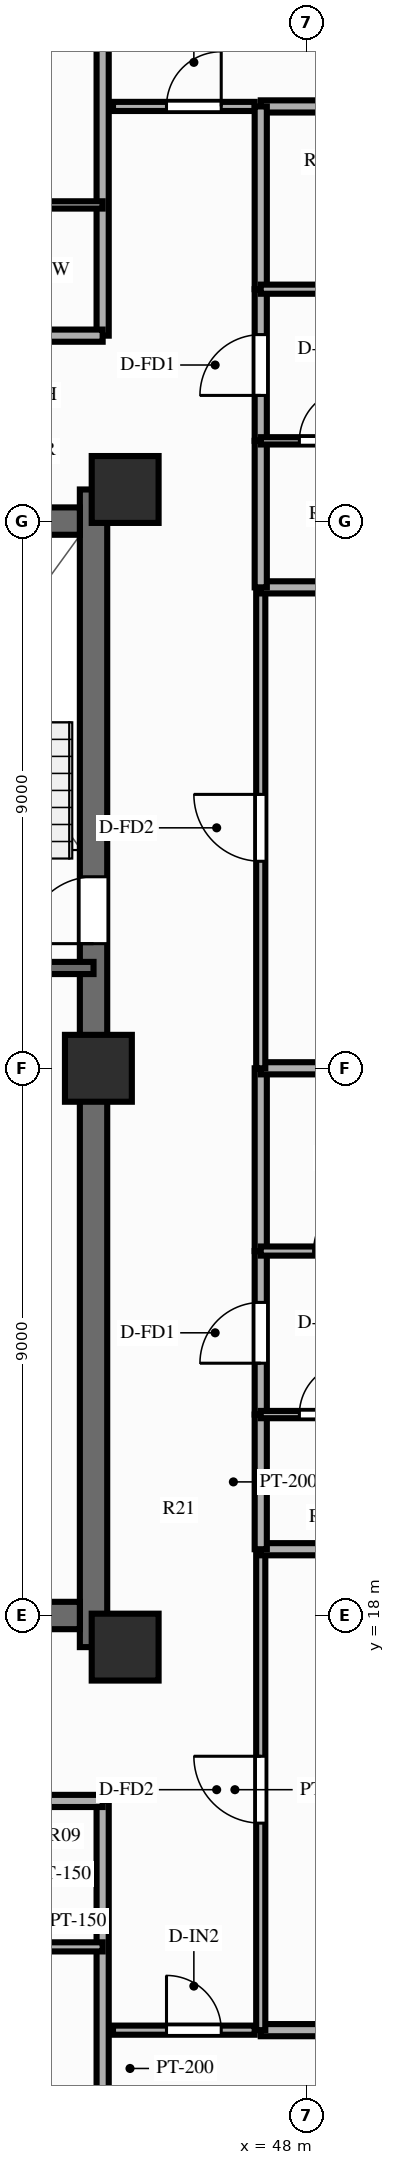
"""IFC4 building model, lengths in metres.
Left out: names, types, materials, properties, quantities, classifications, styles, units other than length and angle.
Written with IfcOpenShell. Run it as: python <this file> out.ifc"""

import sys

from ifc_helpers import new_model, si_unit, direction, frame, frame_2d, origin, origin_2d, place, context, subcontext, project, spatial, rectangle, extrude, source, transform, mapped, element, fill, save


model = new_model("IFC4")
c1 = context("Model", 3, precision=1e-05, world=origin(), true_north=direction((0.0, 1.0)))
c2 = subcontext(c1, "Body", "Model", "MODEL_VIEW")
j1 = project(units=[si_unit("LENGTHUNIT", "METRE"), si_unit("PLANEANGLEUNIT", "RADIAN")], contexts=[c1])
p1 = place(None, origin())
s1 = spatial("IfcSite", under=j1, at=p1, CompositionType="ELEMENT")
p2 = place(p1, origin())
s2 = spatial("IfcBuilding", under=s1, at=p2, CompositionType="ELEMENT")
p3 = place(p2, frame((0.0, 0.0, 189.7)))
s3 = spatial("IfcBuildingStorey", under=s2, at=p3, CompositionType="ELEMENT", Elevation=189.7)
p4 = place(p3, frame((44.5, 17.48, 0.0), z_axis=(0.0, 0.0, 1.0), x_axis=(0.0, 1.0, 0.0)))
e1 = element("IfcWall", 1, at=p4, inside=s3, PredefinedType="SHEAR", context=c2, shape_type="SweptSolid", body=[
    extrude(rectangle(XDim=19.04, YDim=0.45, at=frame_2d((9.52, 0.0))), origin(), (0.0, 0.0, 1.0), 3.0),
])
p5 = place(p4, frame((12.67, 0.0, 0.0), z_axis=(0.0, 0.0, 1.0), x_axis=(-1.0, 0.0, 0.0)))
e2 = element("IfcOpeningElement", 2, at=p5, cuts=e1, PredefinedType="OPENING", context=c2, shape_type="SweptSolid", body=[
    extrude(rectangle(XDim=1.1, YDim=2.15, at=frame_2d((0.55, 1.075))), frame((0.0, 0.237, 0.0), z_axis=(0.0, -1.0, 0.0), x_axis=(1.0, 0.0, 0.0)), (0.0, 0.0, 1.0), 0.474),
])
p6 = place(p3, frame((31.725, 18.0, 0.0), z_axis=(0.0, 0.0, 1.0), x_axis=(1.0, 0.0, 0.0)))
e3 = element("IfcWall", 3, at=p6, inside=s3, PredefinedType="SHEAR", context=c2, shape_type="SweptSolid", body=[
    extrude(rectangle(XDim=12.55, YDim=0.45, at=frame_2d((6.275, 0.0))), origin(), (0.0, 0.0, 1.0), 3.0),
])
p7 = place(p3, frame((31.725, 36.0, 0.0), z_axis=(0.0, 0.0, 1.0), x_axis=(1.0, 0.0, 0.0)))
e4 = element("IfcWall", 4, at=p7, inside=s3, PredefinedType="SHEAR", context=c2, shape_type="SweptSolid", body=[
    extrude(rectangle(XDim=12.55, YDim=0.45, at=frame_2d((6.275, 0.0))), origin(), (0.0, 0.0, 1.0), 3.0),
])
p8 = place(p7, frame((5.225, 0.0, 0.0), z_axis=(0.0, 0.0, 1.0), x_axis=(-1.0, 0.0, 0.0)))
e5 = element("IfcOpeningElement", 5, at=p8, cuts=e4, PredefinedType="OPENING", context=c2, shape_type="SweptSolid", body=[
    extrude(rectangle(XDim=1.4, YDim=2.15, at=frame_2d((0.7, 1.075))), frame((0.0, 0.237, 0.0), z_axis=(0.0, -1.0, 0.0), x_axis=(1.0, 0.0, 0.0)), (0.0, 0.0, 1.0), 0.474),
])
m1 = source(origin(), c2, "Body", "SweptSolid", [
    extrude(rectangle(XDim=1.1, YDim=1.1, at=origin_2d()), origin(), (0.0, 0.0, 1.0), 3.0),
])
for number, where, z_axis, x_axis in (
    (6, (45.02, 17.48, 0.0), (0.0, 0.0, 1.0), (1.0, 0.0, 0.0)),
    (7, (45.02, 36.52, 0.0), (0.0, 0.0, 1.0), (1.0, 0.0, 0.0)),
    (8, (44.58, 27.0, 0.0), (0.0, 0.0, 1.0), (1.0, 0.0, 0.0)),
):
    element("IfcColumn", number, at=place(p3, frame(where, z_axis=z_axis, x_axis=x_axis)), inside=s3, PredefinedType="COLUMN", context=c2, shape_type="MappedRepresentation", body=[
        mapped(m1, transform((0.0, 0.0, 0.0), scale=1.0)),
    ])
p9 = place(p3, frame((40.57, 28.65, 0.0), z_axis=(0.0, 0.0, 1.0), x_axis=(1.0, 0.0, 0.0)))
e9 = element("IfcWall", 9, at=p9, inside=s3, PredefinedType="SOLIDWALL", context=c2, shape_type="SweptSolid", body=[
    extrude(rectangle(XDim=3.93, YDim=0.2, at=frame_2d((1.965, 0.0))), origin(), (0.0, 0.0, 1.0), 2.79),
])
p10 = place(p3, frame((44.82, 11.18, 0.0), z_axis=(0.0, 0.0, 1.0), x_axis=(1.0, 0.0, 0.0)))
e10 = element("IfcWall", 10, at=p10, inside=s3, PredefinedType="PARTITIONING", context=c2, shape_type="SweptSolid", body=[
    extrude(rectangle(XDim=2.33, YDim=0.15, at=frame_2d((1.165, 0.0))), origin(), (0.0, 0.0, 1.0), 2.79),
])
p11 = place(p10, frame((0.88, 0.0, 0.0)))
e11 = element("IfcOpeningElement", 11, at=p11, cuts=e10, PredefinedType="OPENING", context=c2, shape_type="SweptSolid", body=[
    extrude(rectangle(XDim=0.9, YDim=2.1, at=frame_2d((0.45, 1.05))), frame((0.0, 0.087, 0.0), z_axis=(0.0, -1.0, 0.0), x_axis=(1.0, 0.0, 0.0)), (0.0, 0.0, 1.0), 0.174),
])
p12 = place(p3, frame((44.82, 42.82, 0.0), z_axis=(0.0, 0.0, 1.0), x_axis=(1.0, 0.0, 0.0)))
e12 = element("IfcWall", 12, at=p12, inside=s3, PredefinedType="PARTITIONING", context=c2, shape_type="SweptSolid", body=[
    extrude(rectangle(XDim=2.33, YDim=0.15, at=frame_2d((1.165, 0.0))), origin(), (0.0, 0.0, 1.0), 2.79),
])
p13 = place(p12, frame((0.88, 0.0, 0.0)))
e13 = element("IfcOpeningElement", 13, at=p13, cuts=e12, PredefinedType="OPENING", context=c2, shape_type="SweptSolid", body=[
    extrude(rectangle(XDim=0.9, YDim=2.1, at=frame_2d((0.45, 1.05))), frame((0.0, 0.087, 0.0), z_axis=(0.0, -1.0, 0.0), x_axis=(1.0, 0.0, 0.0)), (0.0, 0.0, 1.0), 0.174),
])
p14 = place(p3, frame((44.65, 14.95, 0.0), z_axis=(0.0, 0.0, 1.0), x_axis=(0.0, -1.0, 0.0)))
e14 = element("IfcWall", 14, at=p14, inside=s3, PredefinedType="PARTITIONING", context=c2, shape_type="SweptSolid", body=[
    extrude(rectangle(XDim=8.8, YDim=0.2, at=frame_2d((4.4, 0.0))), origin(), (0.0, 0.0, 1.0), 2.39),
])
p15 = place(p3, frame((42.022, 14.95, 0.0), z_axis=(0.0, 0.0, 1.0), x_axis=(1.0, 0.0, 0.0)))
e15 = element("IfcWall", 15, at=p15, inside=s3, PredefinedType="PARTITIONING", context=c2, shape_type="SweptSolid", body=[
    extrude(rectangle(XDim=2.628, YDim=0.2, at=frame_2d((1.314, 0.0))), origin(), (0.0, 0.0, 1.0), 2.79),
])
p16 = place(p3, frame((42.022, 12.55, 0.0), z_axis=(0.0, 0.0, 1.0), x_axis=(1.0, 0.0, 0.0)))
e16 = element("IfcWall", 16, at=p16, inside=s3, PredefinedType="PARTITIONING", context=c2, shape_type="SweptSolid", body=[
    extrude(rectangle(XDim=2.628, YDim=0.15, at=frame_2d((1.314, 0.0))), origin(), (0.0, 0.0, 1.0), 2.79),
])
p17 = place(p3, frame((44.65, 39.05, 0.0), z_axis=(0.0, 0.0, 1.0), x_axis=(0.0, 1.0, 0.0)))
e17 = element("IfcWall", 17, at=p17, inside=s3, PredefinedType="PARTITIONING", context=c2, shape_type="SweptSolid", body=[
    extrude(rectangle(XDim=8.8, YDim=0.2, at=frame_2d((4.4, 0.0))), origin(), (0.0, 0.0, 1.0), 2.39),
])
p18 = place(p3, frame((42.188, 39.05, 0.0), z_axis=(0.0, 0.0, 1.0), x_axis=(1.0, 0.0, 0.0)))
e18 = element("IfcWall", 18, at=p18, inside=s3, PredefinedType="PARTITIONING", context=c2, shape_type="SweptSolid", body=[
    extrude(rectangle(XDim=2.462, YDim=0.2, at=frame_2d((1.231, 0.0))), origin(), (0.0, 0.0, 1.0), 2.79),
])
p19 = place(p3, frame((42.188, 41.2, 0.0), z_axis=(0.0, 0.0, 1.0), x_axis=(1.0, 0.0, 0.0)))
e19 = element("IfcWall", 19, at=p19, inside=s3, PredefinedType="PARTITIONING", context=c2, shape_type="SweptSolid", body=[
    extrude(rectangle(XDim=2.462, YDim=0.12, at=frame_2d((1.231, 0.0))), origin(), (0.0, 0.0, 1.0), 2.79),
])
for number, where, z_axis, x_axis in (
    (20, (47.25, 11.18, 0.0), (0.0, 0.0, 1.0), (1.0, 0.0, 0.0)),
    (21, (47.25, 42.82, 0.0), (0.0, 0.0, 1.0), (1.0, 0.0, 0.0)),
):
    element("IfcWall", number, at=place(p3, frame(where, z_axis=z_axis, x_axis=x_axis)), inside=s3, PredefinedType="PARTITIONING", context=c2, shape_type="SweptSolid", body=[
        extrude(rectangle(XDim=10.85, YDim=0.2, at=frame_2d((5.425, 0.0))), origin(), (0.0, 0.0, 1.0), 2.79),
    ])
p20 = place(p3, frame((47.25, 11.18, 0.0), z_axis=(0.0, 0.0, 1.0), x_axis=(0.0, 1.0, 0.0)))
e22 = element("IfcWall", 22, at=p20, inside=s3, PredefinedType="PARTITIONING", context=c2, shape_type="SweptSolid", body=[
    extrude(rectangle(XDim=7.91, YDim=0.15, at=frame_2d((3.955, 0.0))), origin(), (0.0, 0.0, 1.0), 2.79),
])
p21 = place(p20, frame((3.405, 0.0, 0.0)))
e23 = element("IfcOpeningElement", 23, at=p21, cuts=e22, PredefinedType="OPENING", context=c2, shape_type="SweptSolid", body=[
    extrude(rectangle(XDim=1.1, YDim=2.15, at=frame_2d((0.55, 1.075))), frame((0.0, 0.087, 0.0), z_axis=(0.0, -1.0, 0.0), x_axis=(1.0, 0.0, 0.0)), (0.0, 0.0, 1.0), 0.174),
])
p22 = place(p3, frame((47.25, 19.09, 0.0), z_axis=(0.0, 0.0, 1.0), x_axis=(1.0, 0.0, 0.0)))
e24 = element("IfcWall", 24, at=p22, inside=s3, PredefinedType="PARTITIONING", context=c2, shape_type="SweptSolid", body=[
    extrude(rectangle(XDim=10.85, YDim=0.2, at=frame_2d((5.425, 0.0))), origin(), (0.0, 0.0, 1.0), 2.79),
])
p23 = place(p3, frame((47.25, 19.09, 0.0), z_axis=(0.0, 0.0, 1.0), x_axis=(0.0, 1.0, 0.0)))
e25 = element("IfcWall", 25, at=p23, inside=s3, PredefinedType="PARTITIONING", context=c2, shape_type="SweptSolid", body=[
    extrude(rectangle(XDim=2.215, YDim=0.2, at=frame_2d((1.107, 0.0))), origin(), (0.0, 0.0, 1.0), 2.79),
])
p24 = place(p3, frame((47.25, 21.305, 0.0), z_axis=(0.0, 0.0, 1.0), x_axis=(0.0, 1.0, 0.0)))
e26 = element("IfcWall", 26, at=p24, inside=s3, PredefinedType="PARTITIONING", context=c2, shape_type="SweptSolid", body=[
    extrude(rectangle(XDim=2.689, YDim=0.2, at=frame_2d((1.345, 0.0))), origin(), (0.0, 0.0, 1.0), 2.79),
])
p25 = place(p24, frame((0.845, 0.0, 0.0)))
e27 = element("IfcOpeningElement", 27, at=p25, cuts=e26, PredefinedType="OPENING", context=c2, shape_type="SweptSolid", body=[
    extrude(rectangle(XDim=1.0, YDim=2.15, at=frame_2d((0.5, 1.075))), frame((0.0, 0.112, 0.0), z_axis=(0.0, -1.0, 0.0), x_axis=(1.0, 0.0, 0.0)), (0.0, 0.0, 1.0), 0.224),
])
p26 = place(p3, frame((47.25, 23.994, 0.0), z_axis=(0.0, 0.0, 1.0), x_axis=(0.0, 1.0, 0.0)))
e28 = element("IfcWall", 28, at=p26, inside=s3, PredefinedType="PARTITIONING", context=c2, shape_type="SweptSolid", body=[
    extrude(rectangle(XDim=3.006, YDim=0.2, at=frame_2d((1.503, 0.0))), origin(), (0.0, 0.0, 1.0), 2.79),
])
p27 = place(p3, frame((47.25, 21.305, 0.0), z_axis=(0.0, 0.0, 1.0), x_axis=(1.0, 0.0, 0.0)))
e29 = element("IfcWall", 29, at=p27, inside=s3, PredefinedType="PARTITIONING", context=c2, shape_type="SweptSolid", body=[
    extrude(rectangle(XDim=2.12, YDim=0.12, at=frame_2d((1.06, 0.0))), origin(), (0.0, 0.0, 1.0), 2.79),
])
p28 = place(p27, frame((0.635, 0.0, 0.0)))
e30 = element("IfcOpeningElement", 30, at=p28, cuts=e29, PredefinedType="OPENING", context=c2, shape_type="SweptSolid", body=[
    extrude(rectangle(XDim=0.85, YDim=2.05, at=frame_2d((0.425, 1.025))), frame((0.0, 0.072, 0.0), z_axis=(0.0, -1.0, 0.0), x_axis=(1.0, 0.0, 0.0)), (0.0, 0.0, 1.0), 0.144),
])
p29 = place(p3, frame((47.25, 23.994, 0.0), z_axis=(0.0, 0.0, 1.0), x_axis=(1.0, 0.0, 0.0)))
e31 = element("IfcWall", 31, at=p29, inside=s3, PredefinedType="PARTITIONING", context=c2, shape_type="SweptSolid", body=[
    extrude(rectangle(XDim=2.64, YDim=0.15, at=frame_2d((1.32, 0.0))), origin(), (0.0, 0.0, 1.0), 2.79),
])
p30 = place(p29, frame((0.87, 0.0, 0.0)))
e32 = element("IfcOpeningElement", 32, at=p30, cuts=e31, PredefinedType="OPENING", context=c2, shape_type="SweptSolid", body=[
    extrude(rectangle(XDim=0.9, YDim=2.1, at=frame_2d((0.45, 1.05))), frame((0.0, 0.087, 0.0), z_axis=(0.0, -1.0, 0.0), x_axis=(1.0, 0.0, 0.0)), (0.0, 0.0, 1.0), 0.174),
])
p31 = place(p3, frame((47.25, 27.0, 0.0), z_axis=(0.0, 0.0, 1.0), x_axis=(1.0, 0.0, 0.0)))
e33 = element("IfcWall", 33, at=p31, inside=s3, PredefinedType="PARTITIONING", context=c2, shape_type="SweptSolid", body=[
    extrude(rectangle(XDim=10.85, YDim=0.2, at=frame_2d((5.425, 0.0))), origin(), (0.0, 0.0, 1.0), 2.79),
])
p32 = place(p3, frame((47.25, 27.0, 0.0), z_axis=(0.0, 0.0, 1.0), x_axis=(0.0, 1.0, 0.0)))
e34 = element("IfcWall", 34, at=p32, inside=s3, PredefinedType="PARTITIONING", context=c2, shape_type="SweptSolid", body=[
    extrude(rectangle(XDim=7.91, YDim=0.15, at=frame_2d((3.955, 0.0))), origin(), (0.0, 0.0, 1.0), 2.79),
])
p33 = place(p32, frame((3.405, 0.0, 0.0)))
e35 = element("IfcOpeningElement", 35, at=p33, cuts=e34, PredefinedType="OPENING", context=c2, shape_type="SweptSolid", body=[
    extrude(rectangle(XDim=1.1, YDim=2.15, at=frame_2d((0.55, 1.075))), frame((0.0, 0.087, 0.0), z_axis=(0.0, -1.0, 0.0), x_axis=(1.0, 0.0, 0.0)), (0.0, 0.0, 1.0), 0.174),
])
p34 = place(p3, frame((47.25, 34.91, 0.0), z_axis=(0.0, 0.0, 1.0), x_axis=(1.0, 0.0, 0.0)))
e36 = element("IfcWall", 36, at=p34, inside=s3, PredefinedType="PARTITIONING", context=c2, shape_type="SweptSolid", body=[
    extrude(rectangle(XDim=10.85, YDim=0.2, at=frame_2d((5.425, 0.0))), origin(), (0.0, 0.0, 1.0), 2.79),
])
p35 = place(p3, frame((47.25, 34.91, 0.0), z_axis=(0.0, 0.0, 1.0), x_axis=(0.0, 1.0, 0.0)))
e37 = element("IfcWall", 37, at=p35, inside=s3, PredefinedType="PARTITIONING", context=c2, shape_type="SweptSolid", body=[
    extrude(rectangle(XDim=2.41, YDim=0.2, at=frame_2d((1.205, 0.0))), origin(), (0.0, 0.0, 1.0), 2.79),
])
p36 = place(p3, frame((47.25, 37.32, 0.0), z_axis=(0.0, 0.0, 1.0), x_axis=(0.0, 1.0, 0.0)))
e38 = element("IfcWall", 38, at=p36, inside=s3, PredefinedType="PARTITIONING", context=c2, shape_type="SweptSolid", body=[
    extrude(rectangle(XDim=2.494, YDim=0.2, at=frame_2d((1.247, 0.0))), origin(), (0.0, 0.0, 1.0), 2.79),
])
p37 = place(p36, frame((0.747, 0.0, 0.0)))
e39 = element("IfcOpeningElement", 39, at=p37, cuts=e38, PredefinedType="OPENING", context=c2, shape_type="SweptSolid", body=[
    extrude(rectangle(XDim=1.0, YDim=2.15, at=frame_2d((0.5, 1.075))), frame((0.0, 0.112, 0.0), z_axis=(0.0, -1.0, 0.0), x_axis=(1.0, 0.0, 0.0)), (0.0, 0.0, 1.0), 0.224),
])
p38 = place(p3, frame((47.25, 39.814, 0.0), z_axis=(0.0, 0.0, 1.0), x_axis=(0.0, 1.0, 0.0)))
e40 = element("IfcWall", 40, at=p38, inside=s3, PredefinedType="PARTITIONING", context=c2, shape_type="SweptSolid", body=[
    extrude(rectangle(XDim=3.006, YDim=0.2, at=frame_2d((1.503, 0.0))), origin(), (0.0, 0.0, 1.0), 2.79),
])
p39 = place(p3, frame((47.25, 37.32, 0.0), z_axis=(0.0, 0.0, 1.0), x_axis=(1.0, 0.0, 0.0)))
e41 = element("IfcWall", 41, at=p39, inside=s3, PredefinedType="PARTITIONING", context=c2, shape_type="SweptSolid", body=[
    extrude(rectangle(XDim=2.12, YDim=0.12, at=frame_2d((1.06, 0.0))), origin(), (0.0, 0.0, 1.0), 2.79),
])
p40 = place(p39, frame((0.635, 0.0, 0.0)))
e42 = element("IfcOpeningElement", 42, at=p40, cuts=e41, PredefinedType="OPENING", context=c2, shape_type="SweptSolid", body=[
    extrude(rectangle(XDim=0.85, YDim=2.05, at=frame_2d((0.425, 1.025))), frame((0.0, 0.072, 0.0), z_axis=(0.0, -1.0, 0.0), x_axis=(1.0, 0.0, 0.0)), (0.0, 0.0, 1.0), 0.144),
])
p41 = place(p3, frame((47.25, 39.814, 0.0), z_axis=(0.0, 0.0, 1.0), x_axis=(1.0, 0.0, 0.0)))
e43 = element("IfcWall", 43, at=p41, inside=s3, PredefinedType="PARTITIONING", context=c2, shape_type="SweptSolid", body=[
    extrude(rectangle(XDim=2.88, YDim=0.15, at=frame_2d((1.44, 0.0))), origin(), (0.0, 0.0, 1.0), 2.79),
])
p42 = place(p41, frame((0.99, 0.0, 0.0)))
e44 = element("IfcOpeningElement", 44, at=p42, cuts=e43, PredefinedType="OPENING", context=c2, shape_type="SweptSolid", body=[
    extrude(rectangle(XDim=0.9, YDim=2.1, at=frame_2d((0.45, 1.05))), frame((0.0, 0.087, 0.0), z_axis=(0.0, -1.0, 0.0), x_axis=(1.0, 0.0, 0.0)), (0.0, 0.0, 1.0), 0.174),
])
m2 = source(origin(), c2, "Body", "SweptSolid", [
    extrude(rectangle(XDim=1.1, YDim=2.15, at=frame_2d((0.55, 1.075))), frame((0.0, 0.025, 0.0), z_axis=(0.0, -1.0, 0.0), x_axis=(1.0, 0.0, 0.0)), (0.0, 0.0, 1.0), 0.05),
])
p43 = place(p5, origin())
e45 = element("IfcDoor", 45, at=p43, inside=s3, OperationType="SINGLE_SWING_RIGHT", PredefinedType="DOOR", context=c2, shape_type="MappedRepresentation", body=[
    mapped(m2, transform((0.0, 0.0, 0.0), scale=1.0)),
])
fill(e2, e45)
m3 = source(origin(), c2, "Body", "SweptSolid", [
    extrude(rectangle(XDim=0.9, YDim=2.1, at=frame_2d((0.45, 1.05))), frame((0.0, 0.025, 0.0), z_axis=(0.0, -1.0, 0.0), x_axis=(1.0, 0.0, 0.0)), (0.0, 0.0, 1.0), 0.05),
])
p44 = place(p11, origin())
e46 = element("IfcDoor", 46, at=p44, inside=s3, OperationType="SINGLE_SWING_LEFT", PredefinedType="DOOR", context=c2, shape_type="MappedRepresentation", body=[
    mapped(m3, transform((0.0, 0.0, 0.0), scale=1.0)),
])
fill(e11, e46)
p45 = place(p13, origin())
e47 = element("IfcDoor", 47, at=p45, inside=s3, OperationType="SINGLE_SWING_RIGHT", PredefinedType="DOOR", context=c2, shape_type="MappedRepresentation", body=[
    mapped(m3, transform((0.0, 0.0, 0.0), scale=1.0)),
])
fill(e13, e47)
p46 = place(p21, origin())
e48 = element("IfcDoor", 48, at=p46, inside=s3, OperationType="SINGLE_SWING_RIGHT", PredefinedType="DOOR", context=c2, shape_type="MappedRepresentation", body=[
    mapped(m2, transform((0.0, 0.0, 0.0), scale=1.0)),
])
fill(e23, e48)
m4 = source(origin(), c2, "Body", "SweptSolid", [
    extrude(rectangle(XDim=1.0, YDim=2.15, at=frame_2d((0.5, 1.075))), frame((0.0, 0.025, 0.0), z_axis=(0.0, -1.0, 0.0), x_axis=(1.0, 0.0, 0.0)), (0.0, 0.0, 1.0), 0.05),
])
p47 = place(p25, origin())
e49 = element("IfcDoor", 49, at=p47, inside=s3, OperationType="SINGLE_SWING_LEFT", PredefinedType="DOOR", context=c2, shape_type="MappedRepresentation", body=[
    mapped(m4, transform((0.0, 0.0, 0.0), scale=1.0)),
])
fill(e27, e49)
m5 = source(origin(), c2, "Body", "SweptSolid", [
    extrude(rectangle(XDim=0.85, YDim=2.05, at=frame_2d((0.425, 1.025))), frame((0.0, 0.025, 0.0), z_axis=(0.0, -1.0, 0.0), x_axis=(1.0, 0.0, 0.0)), (0.0, 0.0, 1.0), 0.05),
])
p48 = place(p28, origin())
e50 = element("IfcDoor", 50, at=p48, inside=s3, OperationType="SINGLE_SWING_RIGHT", PredefinedType="DOOR", context=c2, shape_type="MappedRepresentation", body=[
    mapped(m5, transform((0.0, 0.0, 0.0), scale=1.0)),
])
fill(e30, e50)
p49 = place(p30, origin())
e51 = element("IfcDoor", 51, at=p49, inside=s3, OperationType="SINGLE_SWING_RIGHT", PredefinedType="DOOR", context=c2, shape_type="MappedRepresentation", body=[
    mapped(m3, transform((0.0, 0.0, 0.0), scale=1.0)),
])
fill(e32, e51)
p50 = place(p33, origin())
e52 = element("IfcDoor", 52, at=p50, inside=s3, OperationType="SINGLE_SWING_RIGHT", PredefinedType="DOOR", context=c2, shape_type="MappedRepresentation", body=[
    mapped(m2, transform((0.0, 0.0, 0.0), scale=1.0)),
])
fill(e35, e52)
p51 = place(p37, origin())
e53 = element("IfcDoor", 53, at=p51, inside=s3, OperationType="SINGLE_SWING_LEFT", PredefinedType="DOOR", context=c2, shape_type="MappedRepresentation", body=[
    mapped(m4, transform((0.0, 0.0, 0.0), scale=1.0)),
])
fill(e39, e53)
p52 = place(p40, origin())
e54 = element("IfcDoor", 54, at=p52, inside=s3, OperationType="SINGLE_SWING_RIGHT", PredefinedType="DOOR", context=c2, shape_type="MappedRepresentation", body=[
    mapped(m5, transform((0.0, 0.0, 0.0), scale=1.0)),
])
fill(e42, e54)
save(model, sys.argv[1])
